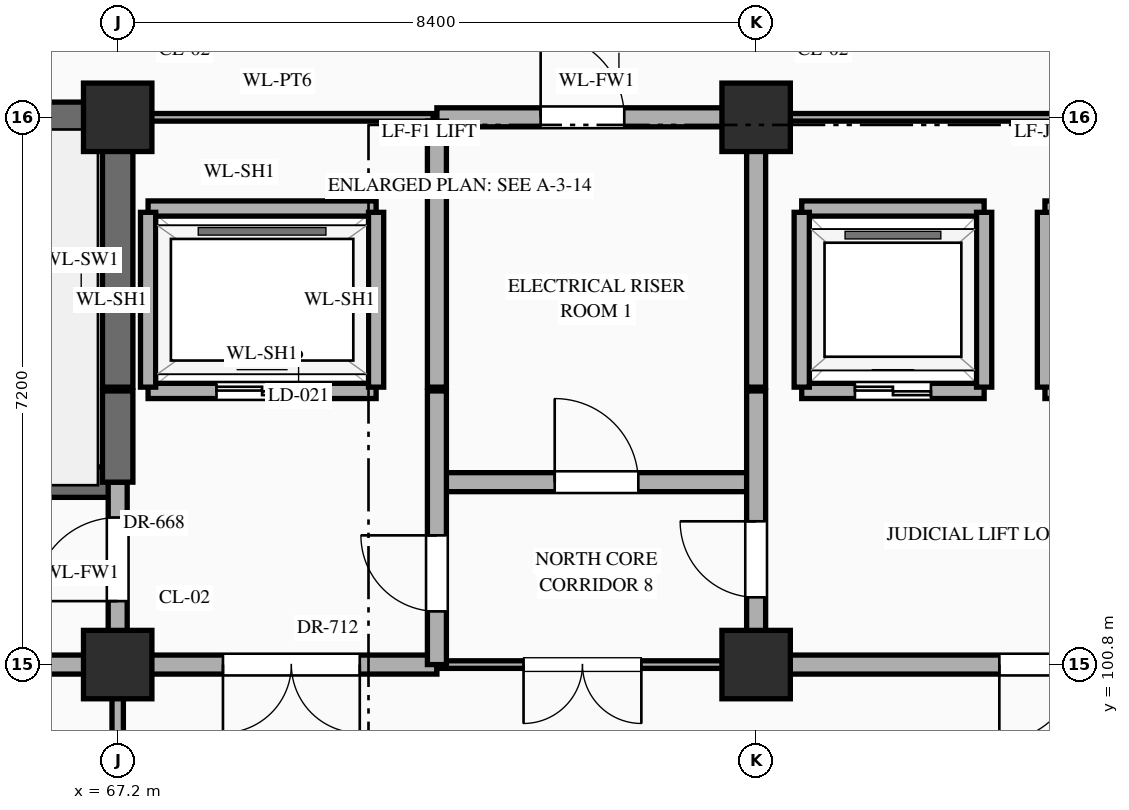
"""IFC4 building model, lengths in metres.
Left out: names, types, materials, properties, quantities, classifications, styles, units other than length and angle.
Written with IfcOpenShell. Run it as: python <this file> out.ifc"""

import sys

from ifc_helpers import new_model, si_unit, direction, frame, frame_2d, origin, origin_2d, place, context, subcontext, project, spatial, rectangle, extrude, element, fill, save


model = new_model("IFC4")
c1 = context("Model", 3, precision=1e-05, world=origin(), true_north=direction((0.0, 1.0)))
c2 = subcontext(c1, "Body", "Model", "MODEL_VIEW")
j1 = project(units=[si_unit("LENGTHUNIT", "METRE"), si_unit("PLANEANGLEUNIT", "RADIAN")], contexts=[c1])
p1 = place(None, origin())
s1 = spatial("IfcSite", under=j1, at=p1, CompositionType="ELEMENT")
p2 = place(p1, origin())
s2 = spatial("IfcBuilding", under=s1, at=p2, CompositionType="ELEMENT")
p3 = place(p2, origin())
s3 = spatial("IfcBuildingStorey", under=s2, at=p3, CompositionType="ELEMENT", Elevation=0.0)
for number, where, z_axis, x_axis in (
    (1, (67.2, 100.8, 0.0), (0.0, 0.0, 1.0), (1.0, 0.0, 0.0)),
    (2, (67.2, 108.0, 0.0), (0.0, 0.0, 1.0), (1.0, 0.0, 0.0)),
    (3, (75.6, 100.8, 0.0), (0.0, 0.0, 1.0), (1.0, 0.0, 0.0)),
    (4, (75.6, 108.0, 0.0), (0.0, 0.0, 1.0), (1.0, 0.0, 0.0)),
):
    element("IfcColumn", number, at=place(p3, frame(where, z_axis=z_axis, x_axis=x_axis)), inside=s3, PredefinedType="COLUMN", context=c2, shape_type="SweptSolid", body=[
        extrude(rectangle(XDim=0.9, YDim=0.9, at=origin_2d()), origin(), (0.0, 0.0, 1.0), 5.4),
    ])
p4 = place(p3, frame((54.6, 100.8, 0.0), z_axis=(0.0, 0.0, 1.0), x_axis=(1.0, 0.0, 0.0)))
e5 = element("IfcWall", 5, at=p4, inside=s3, PredefinedType="STANDARD", context=c2, shape_type="SweptSolid", body=[
    extrude(rectangle(XDim=16.8, YDim=0.25, at=frame_2d((8.4, 0.0))), origin(), (0.0, 0.0, 1.0), 4.27),
])
p5 = place(p4, frame((7.925, 0.0, 0.0)))
e6 = element("IfcOpeningElement", 6, at=p5, cuts=e5, PredefinedType="OPENING", context=c2, shape_type="SweptSolid", body=[
    extrude(rectangle(XDim=0.95, YDim=2.15, at=frame_2d((0.475, 1.075))), frame((0.0, 0.137, 0.0), z_axis=(0.0, -1.0, 0.0), x_axis=(1.0, 0.0, 0.0)), (0.0, 0.0, 1.0), 0.274),
])
p6 = place(p4, frame((13.985, 0.0, 0.0)))
e7 = element("IfcOpeningElement", 7, at=p6, cuts=e5, PredefinedType="OPENING", context=c2, shape_type="SweptSolid", body=[
    extrude(rectangle(XDim=1.8, YDim=2.35, at=frame_2d((0.9, 1.175))), frame((0.0, 0.137, 0.0), z_axis=(0.0, -1.0, 0.0), x_axis=(1.0, 0.0, 0.0)), (0.0, 0.0, 1.0), 0.274),
])
p7 = place(p4, frame((0.25, 0.0, 0.0)))
e8 = element("IfcOpeningElement", 8, at=p7, cuts=e5, PredefinedType="OPENING", context=c2, shape_type="SweptSolid", body=[
    extrude(rectangle(XDim=1.1, YDim=2.2, at=frame_2d((0.55, 1.1))), frame((0.0, 0.137, 0.0), z_axis=(0.0, -1.0, 0.0), x_axis=(1.0, 0.0, 0.0)), (0.0, 0.0, 1.0), 0.274),
])
p8 = place(p3, frame((71.4, 100.8, 0.0), z_axis=(0.0, 0.0, 1.0), x_axis=(1.0, 0.0, 0.0)))
e9 = element("IfcWall", 9, at=p8, inside=s3, PredefinedType="STANDARD", context=c2, shape_type="SweptSolid", body=[
    extrude(rectangle(XDim=4.2, YDim=0.1, at=frame_2d((2.1, 0.0))), origin(), (0.0, 0.0, 1.0), 4.27),
])
p9 = place(p8, frame((1.14, 0.0, 0.0)))
e10 = element("IfcOpeningElement", 10, at=p9, cuts=e9, PredefinedType="OPENING", context=c2, shape_type="SweptSolid", body=[
    extrude(rectangle(XDim=1.55, YDim=2.35, at=frame_2d((0.775, 1.175))), frame((0.0, 0.062, 0.0), z_axis=(0.0, -1.0, 0.0), x_axis=(1.0, 0.0, 0.0)), (0.0, 0.0, 1.0), 0.124),
])
p10 = place(p3, frame((75.6, 100.8, 0.0), z_axis=(0.0, 0.0, 1.0), x_axis=(1.0, 0.0, 0.0)))
e11 = element("IfcWall", 11, at=p10, inside=s3, PredefinedType="STANDARD", context=c2, shape_type="SweptSolid", body=[
    extrude(rectangle(XDim=16.8, YDim=0.25, at=frame_2d((8.4, 0.0))), origin(), (0.0, 0.0, 1.0), 4.27),
])
p11 = place(p10, frame((3.2, 0.0, 0.0)))
e12 = element("IfcOpeningElement", 12, at=p11, cuts=e11, PredefinedType="OPENING", context=c2, shape_type="SweptSolid", body=[
    extrude(rectangle(XDim=2.0, YDim=2.4, at=frame_2d((1.0, 1.2))), frame((0.0, 0.137, 0.0), z_axis=(0.0, -1.0, 0.0), x_axis=(1.0, 0.0, 0.0)), (0.0, 0.0, 1.0), 0.274),
])
p12 = place(p10, frame((11.7, 0.0, 0.0)))
e13 = element("IfcOpeningElement", 13, at=p12, cuts=e11, PredefinedType="OPENING", context=c2, shape_type="SweptSolid", body=[
    extrude(rectangle(XDim=1.8, YDim=2.35, at=frame_2d((0.9, 1.175))), frame((0.0, 0.137, 0.0), z_axis=(0.0, -1.0, 0.0), x_axis=(1.0, 0.0, 0.0)), (0.0, 0.0, 1.0), 0.274),
])
p13 = place(p3, frame((58.8, 103.2, 0.0), z_axis=(0.0, 0.0, 1.0), x_axis=(1.0, 0.0, 0.0)))
e14 = element("IfcWall", 14, at=p13, inside=s3, PredefinedType="SHEAR", context=c2, shape_type="SweptSolid", body=[
    extrude(rectangle(XDim=8.4, YDim=0.4, at=frame_2d((4.2, 0.0))), origin(), (0.0, 0.0, 1.0), 5.12),
])
p14 = place(p13, frame((0.65, 0.0, 0.0)))
e15 = element("IfcOpeningElement", 15, at=p14, cuts=e14, PredefinedType="OPENING", context=c2, shape_type="SweptSolid", body=[
    extrude(rectangle(XDim=1.1, YDim=2.2, at=frame_2d((0.55, 1.1))), frame((0.0, 0.212, 0.0), z_axis=(0.0, -1.0, 0.0), x_axis=(1.0, 0.0, 0.0)), (0.0, 0.0, 1.0), 0.424),
])
p15 = place(p3, frame((71.4, 103.2, 0.0), z_axis=(0.0, 0.0, 1.0), x_axis=(1.0, 0.0, 0.0)))
e16 = element("IfcWall", 16, at=p15, inside=s3, PredefinedType="STANDARD", context=c2, shape_type="SweptSolid", body=[
    extrude(rectangle(XDim=4.2, YDim=0.25, at=frame_2d((2.1, 0.0))), origin(), (0.0, 0.0, 1.0), 5.12),
])
p16 = place(p15, frame((1.55, 0.0, 0.0)))
e17 = element("IfcOpeningElement", 17, at=p16, cuts=e16, PredefinedType="OPENING", context=c2, shape_type="SweptSolid", body=[
    extrude(rectangle(XDim=1.1, YDim=2.2, at=frame_2d((0.55, 1.1))), frame((0.0, 0.137, 0.0), z_axis=(0.0, -1.0, 0.0), x_axis=(1.0, 0.0, 0.0)), (0.0, 0.0, 1.0), 0.274),
])
p17 = place(p3, frame((67.6, 104.4, 0.0), z_axis=(0.0, 0.0, 1.0), x_axis=(1.0, 0.0, 0.0)))
e18 = element("IfcWall", 18, at=p17, inside=s3, PredefinedType="STANDARD", context=c2, shape_type="SweptSolid", body=[
    extrude(rectangle(XDim=3.0, YDim=0.2, at=frame_2d((1.5, 0.0))), origin(), (0.0, 0.0, 1.0), 5.12),
])
p18 = place(p17, frame((0.9, 0.0, 0.0)))
e19 = element("IfcOpeningElement", 19, at=p18, cuts=e18, PredefinedType="OPENING", context=c2, shape_type="SweptSolid", body=[
    extrude(rectangle(XDim=1.2, YDim=2.15, at=frame_2d((0.6, 1.075))), frame((0.0, 0.112, 0.0), z_axis=(0.0, -1.0, 0.0), x_axis=(1.0, 0.0, 0.0)), (0.0, 0.0, 1.0), 0.224),
])
p19 = place(p3, frame((76.2, 104.4, 0.0), z_axis=(0.0, 0.0, 1.0), x_axis=(1.0, 0.0, 0.0)))
e20 = element("IfcWall", 20, at=p19, inside=s3, PredefinedType="STANDARD", context=c2, shape_type="SweptSolid", body=[
    extrude(rectangle(XDim=2.4, YDim=0.2, at=frame_2d((1.2, 0.0))), origin(), (0.0, 0.0, 1.0), 5.12),
])
p20 = place(p19, frame((0.7, 0.0, 0.0)))
e21 = element("IfcOpeningElement", 21, at=p20, cuts=e20, PredefinedType="OPENING", context=c2, shape_type="SweptSolid", body=[
    extrude(rectangle(XDim=1.0, YDim=2.15, at=frame_2d((0.5, 1.075))), frame((0.0, 0.112, 0.0), z_axis=(0.0, -1.0, 0.0), x_axis=(1.0, 0.0, 0.0)), (0.0, 0.0, 1.0), 0.224),
])
p21 = place(p3, frame((79.4, 104.4, 0.0), z_axis=(0.0, 0.0, 1.0), x_axis=(1.0, 0.0, 0.0)))
e22 = element("IfcWall", 22, at=p21, inside=s3, PredefinedType="STANDARD", context=c2, shape_type="SweptSolid", body=[
    extrude(rectangle(XDim=2.4, YDim=0.2, at=frame_2d((1.2, 0.0))), origin(), (0.0, 0.0, 1.0), 5.12),
])
p22 = place(p21, frame((0.7, 0.0, 0.0)))
e23 = element("IfcOpeningElement", 23, at=p22, cuts=e22, PredefinedType="OPENING", context=c2, shape_type="SweptSolid", body=[
    extrude(rectangle(XDim=1.0, YDim=2.15, at=frame_2d((0.5, 1.075))), frame((0.0, 0.112, 0.0), z_axis=(0.0, -1.0, 0.0), x_axis=(1.0, 0.0, 0.0)), (0.0, 0.0, 1.0), 0.224),
])
p23 = place(p3, frame((67.6, 106.8, 0.0), z_axis=(0.0, 0.0, 1.0), x_axis=(1.0, 0.0, 0.0)))
e24 = element("IfcWall", 24, at=p23, inside=s3, PredefinedType="STANDARD", context=c2, shape_type="SweptSolid", body=[
    extrude(rectangle(XDim=3.0, YDim=0.2, at=frame_2d((1.5, 0.0))), origin(), (0.0, 0.0, 1.0), 5.12),
])
for number, where, z_axis, x_axis in (
    (25, (76.2, 106.8, 0.0), (0.0, 0.0, 1.0), (1.0, 0.0, 0.0)),
    (26, (79.4, 106.8, 0.0), (0.0, 0.0, 1.0), (1.0, 0.0, 0.0)),
):
    element("IfcWall", number, at=place(p3, frame(where, z_axis=z_axis, x_axis=x_axis)), inside=s3, PredefinedType="STANDARD", context=c2, shape_type="SweptSolid", body=[
        extrude(rectangle(XDim=2.4, YDim=0.2, at=frame_2d((1.2, 0.0))), origin(), (0.0, 0.0, 1.0), 5.12),
    ])
p24 = place(p3, frame((58.8, 108.0, 0.0), z_axis=(0.0, 0.0, 1.0), x_axis=(1.0, 0.0, 0.0)))
e27 = element("IfcWall", 27, at=p24, inside=s3, PredefinedType="SHEAR", context=c2, shape_type="SweptSolid", body=[
    extrude(rectangle(XDim=8.4, YDim=0.4, at=frame_2d((4.2, 0.0))), origin(), (0.0, 0.0, 1.0), 5.12),
])
p25 = place(p3, frame((67.25, 108.0, 0.0), z_axis=(0.0, 0.0, 1.0), x_axis=(1.0, 0.0, 0.0)))
e28 = element("IfcWall", 28, at=p25, inside=s3, PredefinedType="STANDARD", context=c2, shape_type="SweptSolid", body=[
    extrude(rectangle(XDim=4.1, YDim=0.1, at=frame_2d((2.05, 0.0))), origin(), (0.0, 0.0, 1.0), 4.27),
])
p26 = place(p3, frame((71.4, 108.0, 0.0), z_axis=(0.0, 0.0, 1.0), x_axis=(1.0, 0.0, 0.0)))
e29 = element("IfcWall", 29, at=p26, inside=s3, PredefinedType="STANDARD", context=c2, shape_type="SweptSolid", body=[
    extrude(rectangle(XDim=4.2, YDim=0.25, at=frame_2d((2.1, 0.0))), origin(), (0.0, 0.0, 1.0), 4.27),
])
p27 = place(p26, frame((1.365, 0.0, 0.0)))
e30 = element("IfcOpeningElement", 30, at=p27, cuts=e29, PredefinedType="OPENING", context=c2, shape_type="SweptSolid", body=[
    extrude(rectangle(XDim=1.1, YDim=2.2, at=frame_2d((0.55, 1.1))), frame((0.0, 0.137, 0.0), z_axis=(0.0, -1.0, 0.0), x_axis=(1.0, 0.0, 0.0)), (0.0, 0.0, 1.0), 0.274),
])
p28 = place(p3, frame((75.65, 108.0, 0.0), z_axis=(0.0, 0.0, 1.0), x_axis=(1.0, 0.0, 0.0)))
e31 = element("IfcWall", 31, at=p28, inside=s3, PredefinedType="STANDARD", context=c2, shape_type="SweptSolid", body=[
    extrude(rectangle(XDim=6.15, YDim=0.1, at=frame_2d((3.075, 0.0))), origin(), (0.0, 0.0, 1.0), 4.27),
])
p29 = place(p3, frame((67.2, 96.0, 0.0), z_axis=(0.0, 0.0, 1.0), x_axis=(0.0, 1.0, 0.0)))
e32 = element("IfcWall", 32, at=p29, inside=s3, PredefinedType="STANDARD", context=c2, shape_type="SweptSolid", body=[
    extrude(rectangle(XDim=4.8, YDim=0.15, at=frame_2d((2.4, 0.0))), origin(), (0.0, 0.0, 1.0), 4.37),
])
p30 = place(p29, frame((1.49, 0.0, 0.0)))
e33 = element("IfcOpeningElement", 33, at=p30, cuts=e32, PredefinedType="OPENING", context=c2, shape_type="SweptSolid", body=[
    extrude(rectangle(XDim=1.45, YDim=2.3, at=frame_2d((0.725, 1.15))), frame((0.0, 0.087, 0.0), z_axis=(0.0, -1.0, 0.0), x_axis=(1.0, 0.0, 0.0)), (0.0, 0.0, 1.0), 0.174),
])
p31 = place(p3, frame((67.2, 100.8, 0.0), z_axis=(0.0, 0.0, 1.0), x_axis=(0.0, 1.0, 0.0)))
e34 = element("IfcWall", 34, at=p31, inside=s3, PredefinedType="STANDARD", context=c2, shape_type="SweptSolid", body=[
    extrude(rectangle(XDim=2.4, YDim=0.25, at=frame_2d((1.2, 0.0))), origin(), (0.0, 0.0, 1.0), 4.37),
])
p32 = place(p31, frame((0.835, 0.0, 0.0)))
e35 = element("IfcOpeningElement", 35, at=p32, cuts=e34, PredefinedType="OPENING", context=c2, shape_type="SweptSolid", body=[
    extrude(rectangle(XDim=1.1, YDim=2.2, at=frame_2d((0.55, 1.1))), frame((0.0, 0.137, 0.0), z_axis=(0.0, -1.0, 0.0), x_axis=(1.0, 0.0, 0.0)), (0.0, 0.0, 1.0), 0.274),
])
p33 = place(p3, frame((67.2, 103.2, 0.0), z_axis=(0.0, 0.0, 1.0), x_axis=(0.0, 1.0, 0.0)))
e36 = element("IfcWall", 36, at=p33, inside=s3, PredefinedType="SHEAR", context=c2, shape_type="SweptSolid", body=[
    extrude(rectangle(XDim=1.2, YDim=0.4, at=frame_2d((0.6, 0.0))), origin(), (0.0, 0.0, 1.0), 5.12),
])
p34 = place(p3, frame((67.2, 104.45, 0.0), z_axis=(0.0, 0.0, 1.0), x_axis=(0.0, 1.0, 0.0)))
e37 = element("IfcWall", 37, at=p34, inside=s3, PredefinedType="SHEAR", context=c2, shape_type="SweptSolid", body=[
    extrude(rectangle(XDim=3.5, YDim=0.4, at=frame_2d((1.75, 0.0))), origin(), (0.0, 0.0, 1.0), 5.12),
])
for number, where, z_axis, x_axis in (
    (38, (67.6, 104.45, 0.0), (0.0, 0.0, 1.0), (0.0, 1.0, 0.0)),
    (39, (70.6, 104.45, 0.0), (0.0, 0.0, 1.0), (0.0, 1.0, 0.0)),
):
    element("IfcWall", number, at=place(p3, frame(where, z_axis=z_axis, x_axis=x_axis)), inside=s3, PredefinedType="STANDARD", context=c2, shape_type="SweptSolid", body=[
        extrude(rectangle(XDim=2.3, YDim=0.2, at=frame_2d((1.15, 0.0))), origin(), (0.0, 0.0, 1.0), 5.12),
    ])
p35 = place(p3, frame((71.4, 100.8, 0.0), z_axis=(0.0, 0.0, 1.0), x_axis=(0.0, 1.0, 0.0)))
e40 = element("IfcWall", 40, at=p35, inside=s3, PredefinedType="STANDARD", context=c2, shape_type="SweptSolid", body=[
    extrude(rectangle(XDim=3.6, YDim=0.25, at=frame_2d((1.8, 0.0))), origin(), (0.0, 0.0, 1.0), 4.72),
])
p36 = place(p35, frame((0.7, 0.0, 0.0)))
e41 = element("IfcOpeningElement", 41, at=p36, cuts=e40, PredefinedType="OPENING", context=c2, shape_type="SweptSolid", body=[
    extrude(rectangle(XDim=1.0, YDim=2.2, at=frame_2d((0.5, 1.1))), frame((0.0, 0.137, 0.0), z_axis=(0.0, -1.0, 0.0), x_axis=(1.0, 0.0, 0.0)), (0.0, 0.0, 1.0), 0.274),
])
p37 = place(p3, frame((71.4, 104.45, 0.0), z_axis=(0.0, 0.0, 1.0), x_axis=(0.0, 1.0, 0.0)))
e42 = element("IfcWall", 42, at=p37, inside=s3, PredefinedType="STANDARD", context=c2, shape_type="SweptSolid", body=[
    extrude(rectangle(XDim=3.5, YDim=0.25, at=frame_2d((1.75, 0.0))), origin(), (0.0, 0.0, 1.0), 4.72),
])
p38 = place(p3, frame((75.6, 100.8, 0.0), z_axis=(0.0, 0.0, 1.0), x_axis=(0.0, 1.0, 0.0)))
e43 = element("IfcWall", 43, at=p38, inside=s3, PredefinedType="STANDARD", context=c2, shape_type="SweptSolid", body=[
    extrude(rectangle(XDim=3.6, YDim=0.25, at=frame_2d((1.8, 0.0))), origin(), (0.0, 0.0, 1.0), 4.37),
])
p39 = place(p38, frame((0.885, 0.0, 0.0)))
e44 = element("IfcOpeningElement", 44, at=p39, cuts=e43, PredefinedType="OPENING", context=c2, shape_type="SweptSolid", body=[
    extrude(rectangle(XDim=1.0, YDim=2.2, at=frame_2d((0.5, 1.1))), frame((0.0, 0.137, 0.0), z_axis=(0.0, -1.0, 0.0), x_axis=(1.0, 0.0, 0.0)), (0.0, 0.0, 1.0), 0.274),
])
p40 = place(p3, frame((75.6, 104.45, 0.0), z_axis=(0.0, 0.0, 1.0), x_axis=(0.0, 1.0, 0.0)))
e45 = element("IfcWall", 45, at=p40, inside=s3, PredefinedType="STANDARD", context=c2, shape_type="SweptSolid", body=[
    extrude(rectangle(XDim=3.5, YDim=0.25, at=frame_2d((1.75, 0.0))), origin(), (0.0, 0.0, 1.0), 4.37),
])
for number, where, z_axis, x_axis in (
    (46, (76.2, 104.45, 0.0), (0.0, 0.0, 1.0), (0.0, 1.0, 0.0)),
    (47, (78.6, 104.45, 0.0), (0.0, 0.0, 1.0), (0.0, 1.0, 0.0)),
    (48, (79.4, 104.45, 0.0), (0.0, 0.0, 1.0), (0.0, 1.0, 0.0)),
):
    element("IfcWall", number, at=place(p3, frame(where, z_axis=z_axis, x_axis=x_axis)), inside=s3, PredefinedType="STANDARD", context=c2, shape_type="SweptSolid", body=[
        extrude(rectangle(XDim=2.3, YDim=0.2, at=frame_2d((1.15, 0.0))), origin(), (0.0, 0.0, 1.0), 5.12),
    ])
p41 = place(p18, origin())
e49 = element("IfcDoor", 49, at=p41, inside=s3, OperationType="DOUBLE_DOOR_SLIDING", PredefinedType="DOOR", context=c2, shape_type="SweptSolid", body=[
    extrude(rectangle(XDim=1.2, YDim=2.15, at=frame_2d((0.6, 1.075))), frame((0.0, 0.025, 0.0), z_axis=(0.0, -1.0, 0.0), x_axis=(1.0, 0.0, 0.0)), (0.0, 0.0, 1.0), 0.05),
])
fill(e19, e49)
p42 = place(p20, origin())
e50 = element("IfcDoor", 50, at=p42, inside=s3, OperationType="DOUBLE_DOOR_SLIDING", PredefinedType="DOOR", context=c2, shape_type="SweptSolid", body=[
    extrude(rectangle(XDim=1.0, YDim=2.15, at=frame_2d((0.5, 1.075))), frame((0.0, 0.025, 0.0), z_axis=(0.0, -1.0, 0.0), x_axis=(1.0, 0.0, 0.0)), (0.0, 0.0, 1.0), 0.05),
])
fill(e21, e50)
p43 = place(p32, origin())
e51 = element("IfcDoor", 51, at=p43, inside=s3, OperationType="SINGLE_SWING_LEFT", PredefinedType="DOOR", context=c2, shape_type="SweptSolid", body=[
    extrude(rectangle(XDim=1.1, YDim=2.2, at=frame_2d((0.55, 1.1))), frame((0.0, 0.025, 0.0), z_axis=(0.0, -1.0, 0.0), x_axis=(1.0, 0.0, 0.0)), (0.0, 0.0, 1.0), 0.05),
])
fill(e35, e51)
p44 = place(p36, origin())
e52 = element("IfcDoor", 52, at=p44, inside=s3, OperationType="SINGLE_SWING_RIGHT", PredefinedType="DOOR", context=c2, shape_type="SweptSolid", body=[
    extrude(rectangle(XDim=1.0, YDim=2.2, at=frame_2d((0.5, 1.1))), frame((0.0, 0.025, 0.0), z_axis=(0.0, -1.0, 0.0), x_axis=(1.0, 0.0, 0.0)), (0.0, 0.0, 1.0), 0.05),
])
fill(e41, e52)
p45 = place(p6, frame((1.8, 0.0, 0.0), z_axis=(0.0, 0.0, 1.0), x_axis=(-1.0, 0.0, 0.0)))
e53 = element("IfcDoor", 53, at=p45, inside=s3, OperationType="DOUBLE_DOOR_SINGLE_SWING", PredefinedType="DOOR", context=c2, shape_type="SweptSolid", body=[
    extrude(rectangle(XDim=1.8, YDim=2.35, at=frame_2d((0.9, 1.175))), frame((0.0, 0.025, 0.0), z_axis=(0.0, -1.0, 0.0), x_axis=(1.0, 0.0, 0.0)), (0.0, 0.0, 1.0), 0.05),
])
fill(e7, e53)
p46 = place(p16, origin())
e54 = element("IfcDoor", 54, at=p46, inside=s3, OperationType="SINGLE_SWING_LEFT", PredefinedType="DOOR", context=c2, shape_type="SweptSolid", body=[
    extrude(rectangle(XDim=1.1, YDim=2.2, at=frame_2d((0.55, 1.1))), frame((0.0, 0.025, 0.0), z_axis=(0.0, -1.0, 0.0), x_axis=(1.0, 0.0, 0.0)), (0.0, 0.0, 1.0), 0.05),
])
fill(e17, e54)
p47 = place(p39, origin())
e55 = element("IfcDoor", 55, at=p47, inside=s3, OperationType="SINGLE_SWING_RIGHT", PredefinedType="DOOR", context=c2, shape_type="SweptSolid", body=[
    extrude(rectangle(XDim=1.0, YDim=2.2, at=frame_2d((0.5, 1.1))), frame((0.0, 0.025, 0.0), z_axis=(0.0, -1.0, 0.0), x_axis=(1.0, 0.0, 0.0)), (0.0, 0.0, 1.0), 0.05),
])
fill(e44, e55)
p48 = place(p9, frame((1.55, 0.0, 0.0), z_axis=(0.0, 0.0, 1.0), x_axis=(-1.0, 0.0, 0.0)))
e56 = element("IfcDoor", 56, at=p48, inside=s3, OperationType="DOUBLE_DOOR_SINGLE_SWING", PredefinedType="DOOR", context=c2, shape_type="SweptSolid", body=[
    extrude(rectangle(XDim=1.55, YDim=2.35, at=frame_2d((0.775, 1.175))), frame((0.0, 0.025, 0.0), z_axis=(0.0, -1.0, 0.0), x_axis=(1.0, 0.0, 0.0)), (0.0, 0.0, 1.0), 0.05),
])
fill(e10, e56)
p49 = place(p27, origin())
e57 = element("IfcDoor", 57, at=p49, inside=s3, OperationType="SINGLE_SWING_LEFT", PredefinedType="DOOR", context=c2, shape_type="SweptSolid", body=[
    extrude(rectangle(XDim=1.1, YDim=2.2, at=frame_2d((0.55, 1.1))), frame((0.0, 0.025, 0.0), z_axis=(0.0, -1.0, 0.0), x_axis=(1.0, 0.0, 0.0)), (0.0, 0.0, 1.0), 0.05),
])
fill(e30, e57)
p50 = place(p11, frame((2.0, 0.0, 0.0), z_axis=(0.0, 0.0, 1.0), x_axis=(-1.0, 0.0, 0.0)))
e58 = element("IfcDoor", 58, at=p50, inside=s3, OperationType="DOUBLE_DOOR_SINGLE_SWING", PredefinedType="DOOR", context=c2, shape_type="SweptSolid", body=[
    extrude(rectangle(XDim=2.0, YDim=2.4, at=frame_2d((1.0, 1.2))), frame((0.0, 0.025, 0.0), z_axis=(0.0, -1.0, 0.0), x_axis=(1.0, 0.0, 0.0)), (0.0, 0.0, 1.0), 0.05),
])
fill(e12, e58)
save(model, sys.argv[1])
